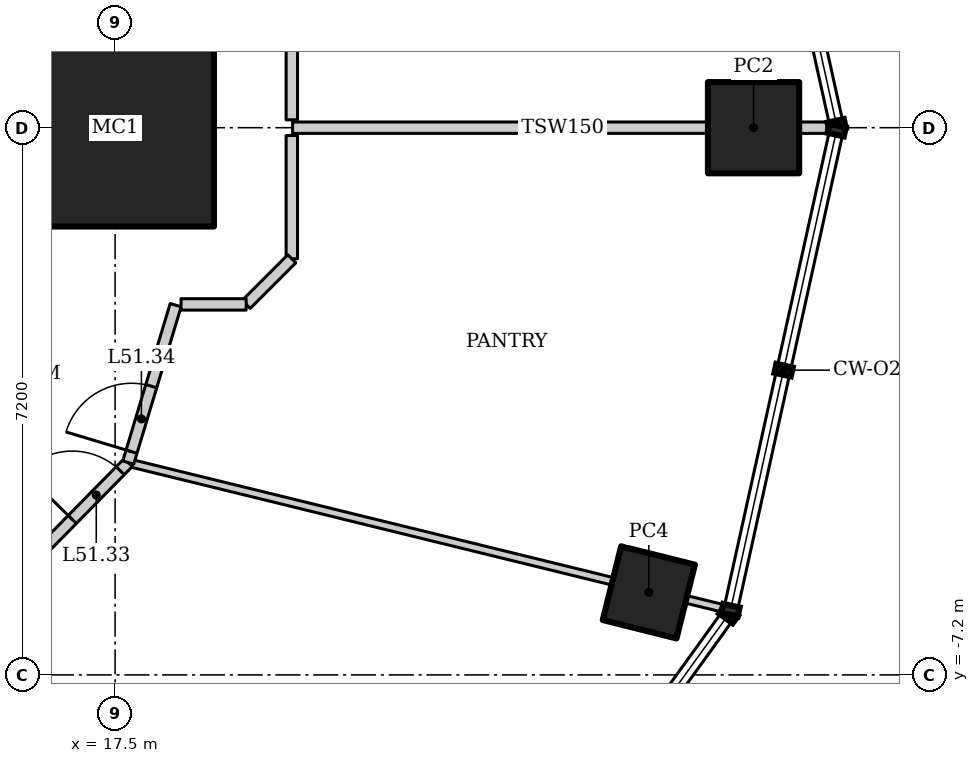
"""IFC4 building model, lengths in metres.
Left out: names, types, materials, properties, quantities, classifications, styles, units other than length and angle.
Written with IfcOpenShell. Run it as: python <this file> out.ifc"""

import sys

from ifc_helpers import new_model, si_unit, direction, frame, frame_2d, origin, origin_2d, place, context, subcontext, project, spatial, rectangle, hollow_rectangle, extrude, element, fill, save


model = new_model("IFC4")
c1 = context("Model", 3, precision=1e-05, world=origin(), true_north=direction((0.0, 1.0)))
c2 = subcontext(c1, "Body", "Model", "MODEL_VIEW")
j1 = project(units=[si_unit("LENGTHUNIT", "METRE"), si_unit("PLANEANGLEUNIT", "RADIAN")], contexts=[c1])
p1 = place(None, origin())
s1 = spatial("IfcSite", under=j1, at=p1, CompositionType="ELEMENT")
p2 = place(p1, origin())
s2 = spatial("IfcBuilding", under=s1, at=p2, CompositionType="ELEMENT")
p3 = place(p2, frame((0.0, 0.0, 220.0)))
s3 = spatial("IfcBuildingStorey", under=s2, at=p3, CompositionType="ELEMENT", Elevation=220.0)
p4 = place(p3, frame((17.5, 0.0, 0.0), z_axis=(0.0, 0.0, 1.0), x_axis=(1.0, 0.0, 0.0)))
e1 = element("IfcColumn", 1, at=p4, inside=s3, PredefinedType="COLUMN", context=c2, shape_type="SweptSolid", body=[
    extrude(hollow_rectangle(XDim=2.6, YDim=2.6, WallThickness=0.13, at=origin_2d()), origin(), (0.0, 0.0, 1.0), 4.2),
])
p5 = place(p3, frame((25.9, 0.0, 0.0), z_axis=(0.0, 0.0, 1.0), x_axis=(1.0, 0.0, 0.0)))
e2 = element("IfcColumn", 2, at=p5, inside=s3, PredefinedType="COLUMN", context=c2, shape_type="SweptSolid", body=[
    extrude(hollow_rectangle(XDim=1.2, YDim=1.2, WallThickness=0.1, at=origin_2d()), origin(), (0.0, 0.0, 1.0), 4.2),
])
p6 = place(p3, frame((24.522, -6.114, 0.0), z_axis=(0.0, 0.0, 1.0), x_axis=(0.2419218956, 0.970295726276, 0.0)))
e3 = element("IfcColumn", 3, at=p6, inside=s3, PredefinedType="COLUMN", context=c2, shape_type="SweptSolid", body=[
    extrude(hollow_rectangle(XDim=1.0, YDim=1.0, WallThickness=0.08, at=origin_2d()), origin(), (0.0, 0.0, 1.0), 4.2),
])
p7 = place(p3, frame((25.543, -6.336, 0.0), z_axis=(0.0, 0.0, 1.0), x_axis=(-0.97123661777, 0.238116425942, 0.0)))
e4 = element("IfcWall", 4, at=p7, inside=s3, PredefinedType="PARTITIONING", context=c2, shape_type="SweptSolid", body=[
    extrude(rectangle(XDim=8.103, YDim=0.1, at=frame_2d((4.052, 0.0))), origin(), (0.0, 0.0, 1.0), 3.108),
])
p8 = place(p3, frame((14.089, -8.051, 0.0), z_axis=(0.0, 0.0, 1.0), x_axis=(0.701111216625, 0.713051934941, 0.0)))
e5 = element("IfcWall", 5, at=p8, inside=s3, PredefinedType="PARTITIONING", context=c2, shape_type="SweptSolid", body=[
    extrude(rectangle(XDim=5.112, YDim=0.15, at=frame_2d((2.556, 0.0))), origin(), (0.0, 0.0, 1.0), 4.05),
])
p9 = place(p8, frame((4.061, 0.0, 0.0)))
e6 = element("IfcOpeningElement", 6, at=p9, cuts=e5, PredefinedType="OPENING", context=c2, shape_type="SweptSolid", body=[
    extrude(rectangle(XDim=0.9, YDim=2.1, at=frame_2d((0.45, 1.05))), frame((0.0, 0.085, 0.0), z_axis=(0.0, -1.0, 0.0), x_axis=(1.0, 0.0, 0.0)), (0.0, 0.0, 1.0), 0.17),
])
p10 = place(p3, frame((26.944, 0.0, 0.0), z_axis=(0.0, 0.0, 1.0), x_axis=(-1.0, 0.0, 0.0)))
e7 = element("IfcWall", 7, at=p10, inside=s3, PredefinedType="PARTITIONING", context=c2, shape_type="SweptSolid", body=[
    extrude(rectangle(XDim=7.109, YDim=0.15, at=frame_2d((3.555, 0.0))), origin(), (0.0, 0.0, 1.0), 3.349),
])
p11 = place(p3, frame((17.673, -4.406, 0.0), z_axis=(0.0, 0.0, 1.0), x_axis=(0.288362447016, 0.957521330912, 0.0)))
e8 = element("IfcWall", 8, at=p11, inside=s3, PredefinedType="PARTITIONING", context=c2, shape_type="SweptSolid", body=[
    extrude(rectangle(XDim=2.163, YDim=0.15, at=frame_2d((1.082, 0.0))), origin(), (0.0, 0.0, 1.0), 4.05),
])
p12 = place(p11, frame((0.15, 0.0, 0.0)))
e9 = element("IfcOpeningElement", 9, at=p12, cuts=e8, PredefinedType="OPENING", context=c2, shape_type="SweptSolid", body=[
    extrude(rectangle(XDim=0.9, YDim=2.1, at=frame_2d((0.45, 1.05))), frame((0.0, 0.085, 0.0), z_axis=(0.0, -1.0, 0.0), x_axis=(1.0, 0.0, 0.0)), (0.0, 0.0, 1.0), 0.17),
])
for number, where, z_axis, x_axis in (
    (10, (19.825, 1.725, 0.0), (0.0, 0.0, 1.0), (0.0, -1.0, 0.0)),
    (11, (19.825, -0.103, 0.0), (0.0, 0.0, 1.0), (0.0, -1.0, 0.0)),
):
    element("IfcWall", number, at=place(p3, frame(where, z_axis=z_axis, x_axis=x_axis)), inside=s3, PredefinedType="PARTITIONING", context=c2, shape_type="SweptSolid", body=[
        extrude(rectangle(XDim=1.621, YDim=0.15, at=frame_2d((0.811, 0.0))), origin(), (0.0, 0.0, 1.0), 4.05),
    ])
p13 = place(p3, frame((19.825, -1.725, 0.0), z_axis=(0.0, 0.0, 1.0), x_axis=(-0.707106781187, -0.707106781187, 0.0)))
e12 = element("IfcWall", 12, at=p13, inside=s3, PredefinedType="PARTITIONING", context=c2, shape_type="SweptSolid", body=[
    extrude(rectangle(XDim=0.849, YDim=0.15, at=frame_2d((0.425, 0.0))), origin(), (0.0, 0.0, 1.0), 4.05),
])
p14 = place(p3, frame((19.225, -2.325, 0.0), z_axis=(0.0, 0.0, 1.0), x_axis=(-1.0, 0.0, 0.0)))
e13 = element("IfcWall", 13, at=p14, inside=s3, PredefinedType="PARTITIONING", context=c2, shape_type="SweptSolid", body=[
    extrude(rectangle(XDim=0.857, YDim=0.15, at=frame_2d((0.429, 0.0))), origin(), (0.0, 0.0, 1.0), 4.05),
])
p15 = place(p9, origin())
e14 = element("IfcDoor", 14, at=p15, inside=s3, OperationType="SINGLE_SWING_LEFT", PredefinedType="DOOR", context=c2, shape_type="SweptSolid", body=[
    extrude(rectangle(XDim=0.9, YDim=2.1, at=frame_2d((0.45, 1.05))), frame((0.0, 0.025, 0.0), z_axis=(0.0, -1.0, 0.0), x_axis=(1.0, 0.0, 0.0)), (0.0, 0.0, 1.0), 0.05),
])
fill(e6, e14)
p16 = place(p12, origin())
e15 = element("IfcDoor", 15, at=p16, inside=s3, OperationType="SINGLE_SWING_LEFT", PredefinedType="DOOR", context=c2, shape_type="SweptSolid", body=[
    extrude(rectangle(XDim=0.9, YDim=2.1, at=frame_2d((0.45, 1.05))), frame((0.0, 0.025, 0.0), z_axis=(0.0, -1.0, 0.0), x_axis=(1.0, 0.0, 0.0)), (0.0, 0.0, 1.0), 0.05),
])
fill(e9, e15)
save(model, sys.argv[1])
